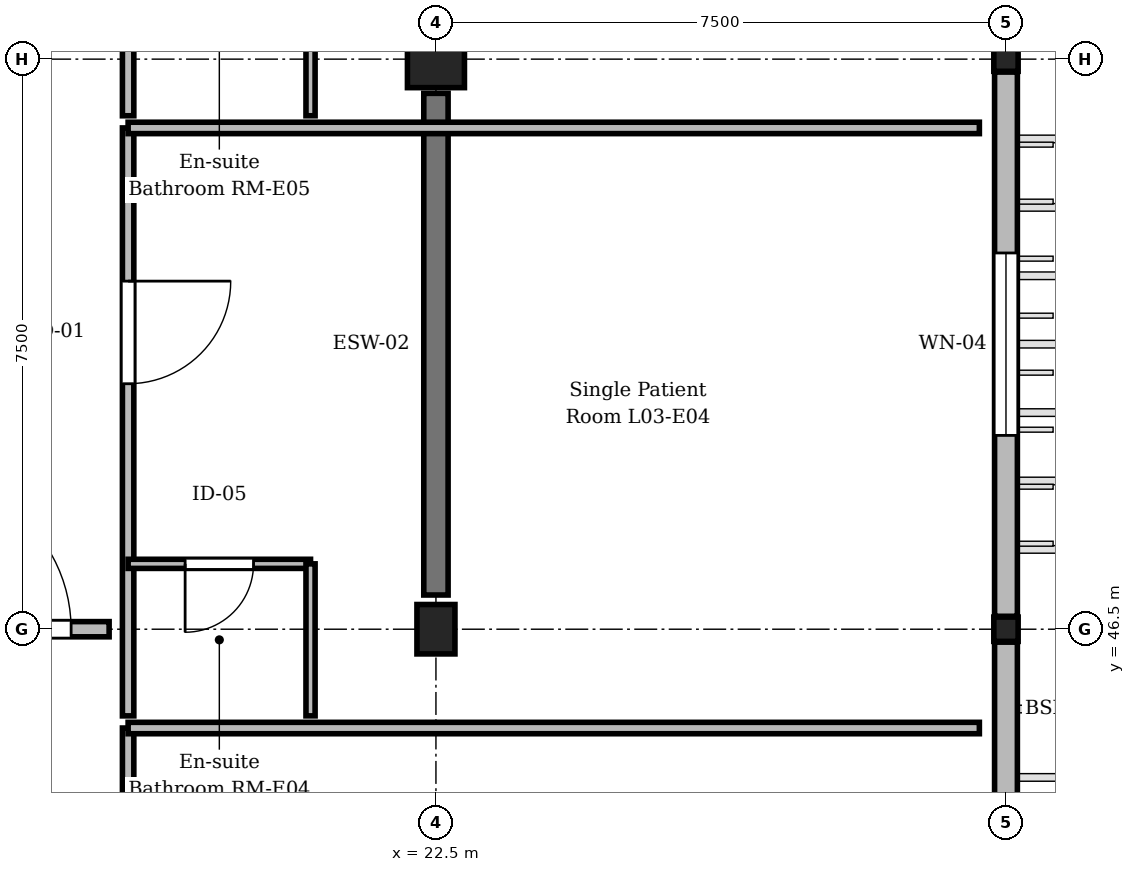
"""IFC4 building model, lengths in metres.
Left out: names, types, materials, properties, quantities, classifications, styles, units other than length and angle.
Written with IfcOpenShell. Run it as: python <this file> out.ifc"""

import sys

from ifc_helpers import new_model, si_unit, direction, frame, frame_2d, origin, origin_2d, place, context, subcontext, project, spatial, rectangle, extrude, element, fill, save


model = new_model("IFC4")
c1 = context("Model", 3, precision=1e-05, world=origin(), true_north=direction((0.0, 1.0)))
c2 = subcontext(c1, "Body", "Model", "MODEL_VIEW")
j1 = project(units=[si_unit("LENGTHUNIT", "METRE"), si_unit("PLANEANGLEUNIT", "RADIAN")], contexts=[c1])
p1 = place(None, origin())
s1 = spatial("IfcSite", under=j1, at=p1, CompositionType="ELEMENT")
p2 = place(p1, origin())
s2 = spatial("IfcBuilding", under=s1, at=p2, CompositionType="ELEMENT")
p3 = place(p2, frame((0.0, 0.0, 14.1)))
s3 = spatial("IfcBuildingStorey", under=s2, at=p3, CompositionType="ELEMENT", Elevation=14.1)
p4 = place(p3, frame((22.5, 46.5, 0.0), z_axis=(0.0, 0.0, 1.0), x_axis=(1.0, 0.0, 0.0)))
e1 = element("IfcColumn", 1, at=p4, inside=s3, PredefinedType="COLUMN", context=c2, shape_type="SweptSolid", body=[
    extrude(rectangle(XDim=0.5, YDim=0.65, at=origin_2d()), origin(), (0.0, 0.0, 1.0), 3.75),
])
p5 = place(p3, frame((22.5, 54.0, 0.0), z_axis=(0.0, 0.0, 1.0), x_axis=(1.0, 0.0, 0.0)))
e2 = element("IfcColumn", 2, at=p5, inside=s3, PredefinedType="COLUMN", context=c2, shape_type="SweptSolid", body=[
    extrude(rectangle(XDim=0.75, YDim=0.75, at=origin_2d()), origin(), (0.0, 0.0, 1.0), 3.75),
])
for number, where, z_axis, x_axis in (
    (3, (30.0, 46.5, 0.0), (0.0, 0.0, 1.0), (1.0, 0.0, 0.0)),
    (4, (30.0, 54.0, 0.0), (0.0, 0.0, 1.0), (1.0, 0.0, 0.0)),
):
    element("IfcColumn", number, at=place(p3, frame(where, z_axis=z_axis, x_axis=x_axis)), inside=s3, PredefinedType="COLUMN", context=c2, shape_type="SweptSolid", body=[
        extrude(rectangle(XDim=0.32, YDim=0.32, at=origin_2d()), origin(), (0.0, 0.0, 1.0), 3.75),
    ])
p6 = place(p3, frame((22.5, 46.95, 0.0), z_axis=(0.0, 0.0, 1.0), x_axis=(0.0, 1.0, 0.0)))
e5 = element("IfcWall", 5, at=p6, inside=s3, PredefinedType="SHEAR", context=c2, shape_type="SweptSolid", body=[
    extrude(rectangle(XDim=6.6, YDim=0.32, at=frame_2d((3.3, 0.0))), origin(), (0.0, 0.0, 1.0), 2.92),
])
p7 = place(p3, frame((30.0, 46.33, 0.0), z_axis=(0.0, 0.0, 1.0), x_axis=(0.0, -1.0, 0.0)))
e6 = element("IfcWall", 6, at=p7, inside=s3, PredefinedType="STANDARD", context=c2, shape_type="SweptSolid", body=[
    extrude(rectangle(XDim=7.16, YDim=0.3, at=frame_2d((3.58, 0.0))), origin(), (0.0, 0.0, 1.0), 2.87),
])
p8 = place(p7, frame((2.53, 0.0, 0.9)))
e7 = element("IfcOpeningElement", 7, at=p8, cuts=e6, PredefinedType="OPENING", context=c2, shape_type="SweptSolid", body=[
    extrude(rectangle(XDim=2.1, YDim=1.69, at=frame_2d((1.05, 0.845))), frame((0.0, 0.16, 0.0), z_axis=(0.0, -1.0, 0.0), x_axis=(1.0, 0.0, 0.0)), (0.0, 0.0, 1.0), 0.32),
])
p9 = place(p3, frame((30.0, 53.83, 0.0), z_axis=(0.0, 0.0, 1.0), x_axis=(0.0, -1.0, 0.0)))
e8 = element("IfcWall", 8, at=p9, inside=s3, PredefinedType="STANDARD", context=c2, shape_type="SweptSolid", body=[
    extrude(rectangle(XDim=7.16, YDim=0.3, at=frame_2d((3.58, 0.0))), origin(), (0.0, 0.0, 1.0), 2.87),
])
p10 = place(p9, frame((2.38, 0.0, 0.9)))
e9 = element("IfcOpeningElement", 9, at=p10, cuts=e8, PredefinedType="OPENING", context=c2, shape_type="SweptSolid", body=[
    extrude(rectangle(XDim=2.4, YDim=1.69, at=frame_2d((1.2, 0.845))), frame((0.0, 0.16, 0.0), z_axis=(0.0, -1.0, 0.0), x_axis=(1.0, 0.0, 0.0)), (0.0, 0.0, 1.0), 0.32),
])
p11 = place(p3, frame((18.45, 45.2, 0.0), z_axis=(0.0, 0.0, 1.0), x_axis=(0.0, -1.0, 0.0)))
e10 = element("IfcWall", 10, at=p11, inside=s3, PredefinedType="PARTITIONING", context=c2, shape_type="SweptSolid", body=[
    extrude(rectangle(XDim=7.735, YDim=0.15, at=frame_2d((3.867, 0.0))), origin(), (0.0, 0.0, 1.0), 3.455),
])
p12 = place(p11, frame((2.015, 0.0, 0.0)))
e11 = element("IfcOpeningElement", 11, at=p12, cuts=e10, PredefinedType="OPENING", context=c2, shape_type="SweptSolid", body=[
    extrude(rectangle(XDim=1.35, YDim=2.25, at=frame_2d((0.675, 1.125))), frame((0.0, 0.085, 0.0), z_axis=(0.0, -1.0, 0.0), x_axis=(1.0, 0.0, 0.0)), (0.0, 0.0, 1.0), 0.17),
])
p13 = place(p3, frame((18.45, 53.095, 0.0), z_axis=(0.0, 0.0, 1.0), x_axis=(0.0, -1.0, 0.0)))
e12 = element("IfcWall", 12, at=p13, inside=s3, PredefinedType="PARTITIONING", context=c2, shape_type="SweptSolid", body=[
    extrude(rectangle(XDim=7.735, YDim=0.15, at=frame_2d((3.867, 0.0))), origin(), (0.0, 0.0, 1.0), 3.455),
])
p14 = place(p13, frame((2.015, 0.0, 0.0)))
e13 = element("IfcOpeningElement", 13, at=p14, cuts=e12, PredefinedType="OPENING", context=c2, shape_type="SweptSolid", body=[
    extrude(rectangle(XDim=1.35, YDim=2.25, at=frame_2d((0.675, 1.125))), frame((0.0, 0.085, 0.0), z_axis=(0.0, -1.0, 0.0), x_axis=(1.0, 0.0, 0.0)), (0.0, 0.0, 1.0), 0.17),
])
p15 = place(p3, frame((20.85, 47.36, 0.0), z_axis=(0.0, 0.0, 1.0), x_axis=(-1.0, 0.0, 0.0)))
e14 = element("IfcWall", 14, at=p15, inside=s3, PredefinedType="PARTITIONING", context=c2, shape_type="SweptSolid", body=[
    extrude(rectangle(XDim=2.4, YDim=0.12, at=frame_2d((1.2, 0.0))), origin(), (0.0, 0.0, 1.0), 3.455),
])
p16 = place(p15, frame((0.75, 0.0, 0.0)))
e15 = element("IfcOpeningElement", 15, at=p16, cuts=e14, PredefinedType="OPENING", context=c2, shape_type="SweptSolid", body=[
    extrude(rectangle(XDim=0.9, YDim=2.1, at=frame_2d((0.45, 1.05))), frame((0.0, 0.07, 0.0), z_axis=(0.0, -1.0, 0.0), x_axis=(1.0, 0.0, 0.0)), (0.0, 0.0, 1.0), 0.14),
])
p17 = place(p3, frame((20.85, 45.36, 0.0), z_axis=(0.0, 0.0, 1.0), x_axis=(0.0, 1.0, 0.0)))
e16 = element("IfcWall", 16, at=p17, inside=s3, PredefinedType="PARTITIONING", context=c2, shape_type="SweptSolid", body=[
    extrude(rectangle(XDim=2.0, YDim=0.12, at=frame_2d((1.0, 0.0))), origin(), (0.0, 0.0, 1.0), 3.455),
])
p18 = place(p3, frame((18.45, 60.99, 0.0), z_axis=(0.0, 0.0, 1.0), x_axis=(0.0, -1.0, 0.0)))
e17 = element("IfcWall", 17, at=p18, inside=s3, PredefinedType="PARTITIONING", context=c2, shape_type="SweptSolid", body=[
    extrude(rectangle(XDim=7.735, YDim=0.15, at=frame_2d((3.868, 0.0))), origin(), (0.0, 0.0, 1.0), 3.455),
])
p19 = place(p18, frame((2.604, 0.0, 0.0)))
e18 = element("IfcOpeningElement", 18, at=p19, cuts=e17, PredefinedType="OPENING", context=c2, shape_type="SweptSolid", body=[
    extrude(rectangle(XDim=1.35, YDim=2.25, at=frame_2d((0.675, 1.125))), frame((0.0, 0.085, 0.0), z_axis=(0.0, -1.0, 0.0), x_axis=(1.0, 0.0, 0.0)), (0.0, 0.0, 1.0), 0.17),
])
p20 = place(p3, frame((20.85, 53.255, 0.0), z_axis=(0.0, 0.0, 1.0), x_axis=(0.0, 1.0, 0.0)))
e19 = element("IfcWall", 19, at=p20, inside=s3, PredefinedType="PARTITIONING", context=c2, shape_type="SweptSolid", body=[
    extrude(rectangle(XDim=2.0, YDim=0.12, at=frame_2d((1.0, 0.0))), origin(), (0.0, 0.0, 1.0), 3.455),
])
for number, where, z_axis, x_axis in (
    (20, (18.45, 45.2, 0.0), (0.0, 0.0, 1.0), (1.0, 0.0, 0.0)),
    (21, (18.45, 53.095, 0.0), (0.0, 0.0, 1.0), (1.0, 0.0, 0.0)),
):
    element("IfcWall", number, at=place(p3, frame(where, z_axis=z_axis, x_axis=x_axis)), inside=s3, PredefinedType="PARTITIONING", context=c2, shape_type="SweptSolid", body=[
        extrude(rectangle(XDim=11.2, YDim=0.15, at=frame_2d((5.6, 0.0))), origin(), (0.0, 0.0, 1.0), 3.455),
    ])
p21 = place(p3, frame((15.2, 46.5, 0.0), z_axis=(0.0, 0.0, 1.0), x_axis=(1.0, 0.0, 0.0)))
e22 = element("IfcWall", 22, at=p21, inside=s3, PredefinedType="STANDARD", context=c2, shape_type="SweptSolid", body=[
    extrude(rectangle(XDim=3.0, YDim=0.2, at=frame_2d((1.5, 0.0))), origin(), (0.0, 0.0, 1.0), 2.855),
])
p22 = place(p21, frame((0.5, 0.0, 0.0)))
e23 = element("IfcOpeningElement", 23, at=p22, cuts=e22, PredefinedType="OPENING", context=c2, shape_type="SweptSolid", body=[
    extrude(rectangle(XDim=2.0, YDim=2.3, at=frame_2d((1.0, 1.15))), frame((0.0, 0.11, 0.0), z_axis=(0.0, -1.0, 0.0), x_axis=(1.0, 0.0, 0.0)), (0.0, 0.0, 1.0), 0.22),
])
p23 = place(p10, origin())
e24 = element("IfcWindow", 24, at=p23, inside=s3, PartitioningType="SINGLE_PANEL", PredefinedType="WINDOW", context=c2, shape_type="SweptSolid", body=[
    extrude(rectangle(XDim=2.4, YDim=1.69, at=frame_2d((1.2, 0.845))), frame((0.0, 0.03, 0.0), z_axis=(0.0, -1.0, 0.0), x_axis=(1.0, 0.0, 0.0)), (0.0, 0.0, 1.0), 0.06),
])
fill(e9, e24)
p24 = place(p14, origin())
e25 = element("IfcDoor", 25, at=p24, inside=s3, OperationType="SINGLE_SWING_LEFT", PredefinedType="DOOR", context=c2, shape_type="SweptSolid", body=[
    extrude(rectangle(XDim=1.35, YDim=2.25, at=frame_2d((0.675, 1.125))), frame((0.0, 0.025, 0.0), z_axis=(0.0, -1.0, 0.0), x_axis=(1.0, 0.0, 0.0)), (0.0, 0.0, 1.0), 0.05),
])
fill(e13, e25)
p25 = place(p16, origin())
e26 = element("IfcDoor", 26, at=p25, inside=s3, OperationType="SINGLE_SWING_RIGHT", PredefinedType="DOOR", context=c2, shape_type="SweptSolid", body=[
    extrude(rectangle(XDim=0.9, YDim=2.1, at=frame_2d((0.45, 1.05))), frame((0.0, 0.025, 0.0), z_axis=(0.0, -1.0, 0.0), x_axis=(1.0, 0.0, 0.0)), (0.0, 0.0, 1.0), 0.05),
])
fill(e15, e26)
p26 = place(p22, origin())
e27 = element("IfcDoor", 27, at=p26, inside=s3, OperationType="DOUBLE_DOOR_SINGLE_SWING", PredefinedType="DOOR", context=c2, shape_type="SweptSolid", body=[
    extrude(rectangle(XDim=2.0, YDim=2.3, at=frame_2d((1.0, 1.15))), frame((0.0, 0.025, 0.0), z_axis=(0.0, -1.0, 0.0), x_axis=(1.0, 0.0, 0.0)), (0.0, 0.0, 1.0), 0.05),
])
fill(e23, e27)
save(model, sys.argv[1])
